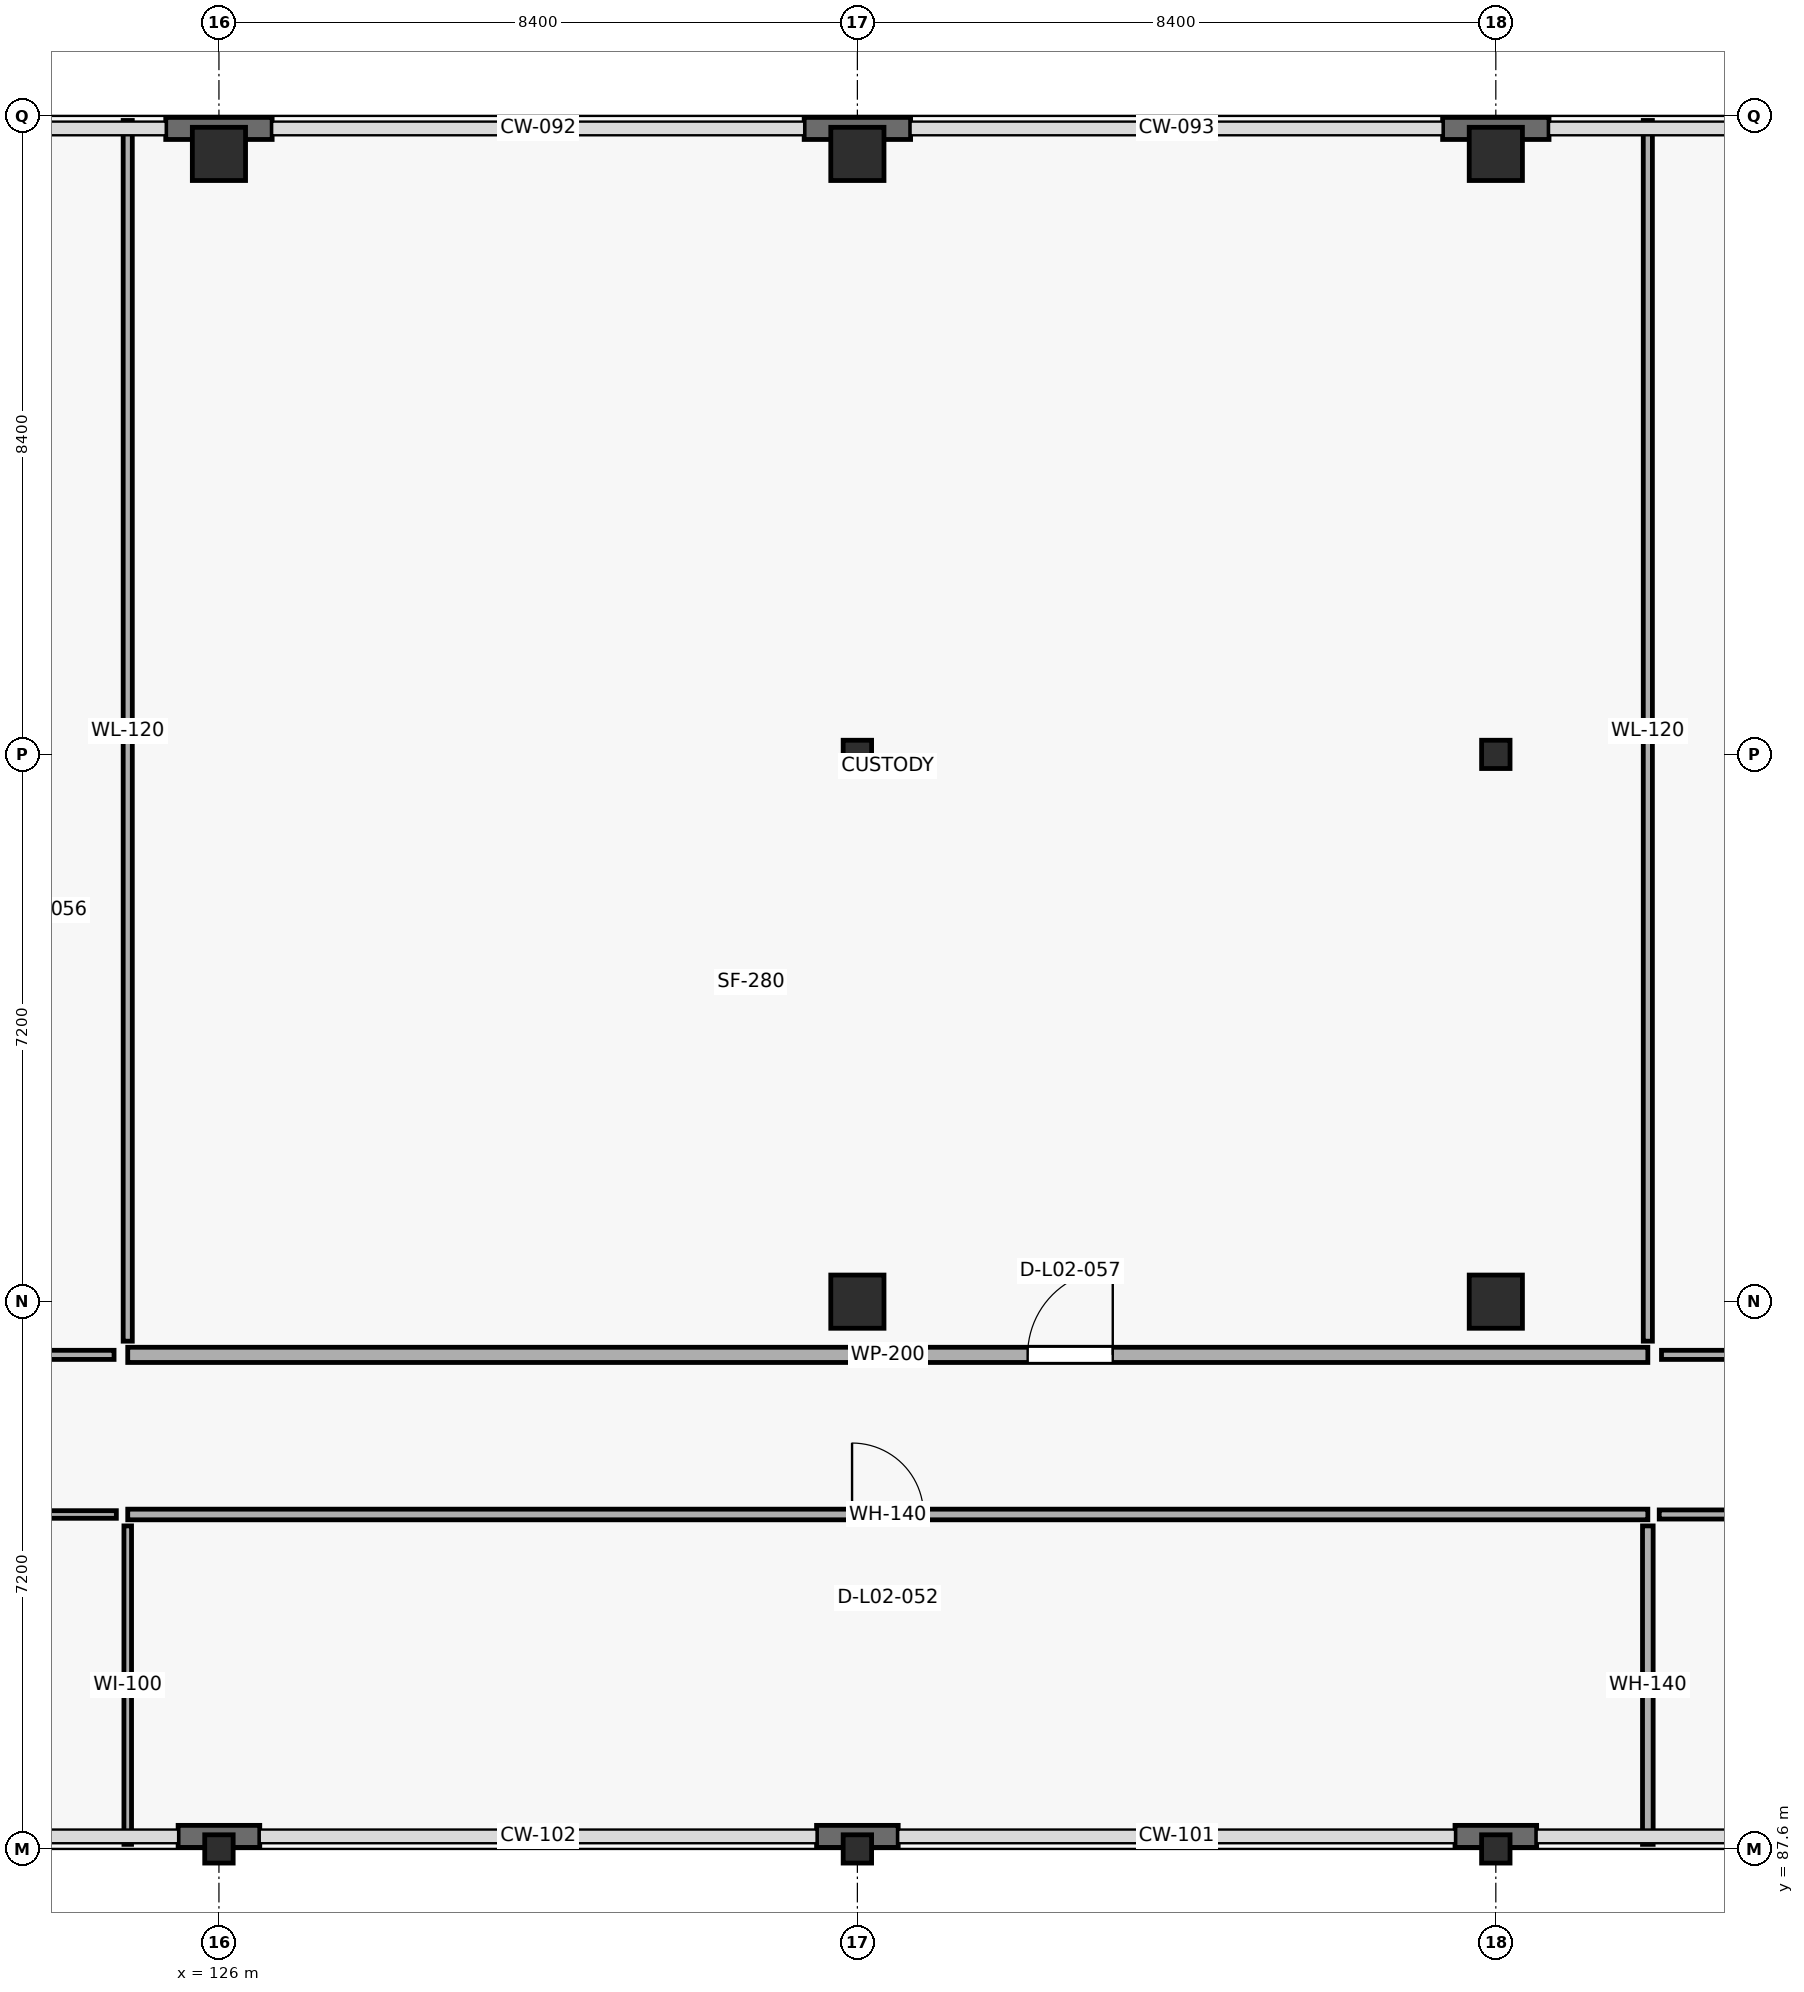
"""IFC4 building model, lengths in metres.
Left out: names, types, materials, properties, quantities, classifications, styles, units other than length and angle.
Written with IfcOpenShell. Run it as: python <this file> out.ifc"""

import sys

from ifc_helpers import new_model, si_unit, direction, frame, frame_2d, origin, origin_2d, place, context, subcontext, project, spatial, rectangle, i_section, extrude, element, fill, save


model = new_model("IFC4")
c1 = context("Model", 3, precision=1e-05, world=origin(), true_north=direction((0.0, 1.0)))
c2 = subcontext(c1, "Body", "Model", "MODEL_VIEW")
j1 = project(units=[si_unit("LENGTHUNIT", "METRE"), si_unit("PLANEANGLEUNIT", "RADIAN")], contexts=[c1])
p1 = place(None, origin())
s1 = spatial("IfcSite", under=j1, at=p1, CompositionType="ELEMENT")
p2 = place(p1, origin())
s2 = spatial("IfcBuilding", under=s1, at=p2, CompositionType="ELEMENT")
p3 = place(p2, frame((0.0, 0.0, 5.4)))
s3 = spatial("IfcBuildingStorey", under=s2, at=p3, CompositionType="ELEMENT", Elevation=5.4)
p4 = place(p3, frame((126.0, 87.6, 0.0), z_axis=(0.0, 0.0, 1.0), x_axis=(1.0, 0.0, 0.0)))
e1 = element("IfcColumn", 1, at=p4, inside=s3, PredefinedType="COLUMN", context=c2, shape_type="SweptSolid", body=[
    extrude(i_section(OverallWidth=0.374, OverallDepth=0.372, WebThickness=0.016, FlangeThickness=0.026, at=origin_2d()), origin(), (0.0, 0.0, 1.0), 4.8),
])
p5 = place(p3, frame((126.0, 109.9, 0.0), z_axis=(0.0, 0.0, 1.0), x_axis=(1.0, 0.0, 0.0)))
e2 = element("IfcColumn", 2, at=p5, inside=s3, PredefinedType="COLUMN", context=c2, shape_type="SweptSolid", body=[
    extrude(rectangle(XDim=0.7, YDim=0.7, at=origin_2d()), origin(), (0.0, 0.0, 1.0), 4.8),
])
p6 = place(p3, frame((134.4, 87.6, 0.0), z_axis=(0.0, 0.0, 1.0), x_axis=(1.0, 0.0, 0.0)))
e3 = element("IfcColumn", 3, at=p6, inside=s3, PredefinedType="COLUMN", context=c2, shape_type="SweptSolid", body=[
    extrude(i_section(OverallWidth=0.374, OverallDepth=0.372, WebThickness=0.016, FlangeThickness=0.026, at=origin_2d()), origin(), (0.0, 0.0, 1.0), 4.8),
])
p7 = place(p3, frame((134.4, 94.8, 0.0), z_axis=(0.0, 0.0, 1.0), x_axis=(1.0, 0.0, 0.0)))
e4 = element("IfcColumn", 4, at=p7, inside=s3, PredefinedType="COLUMN", context=c2, shape_type="SweptSolid", body=[
    extrude(rectangle(XDim=0.7, YDim=0.7, at=origin_2d()), origin(), (0.0, 0.0, 1.0), 4.8),
])
p8 = place(p3, frame((134.4, 102.0, 0.0), z_axis=(0.0, 0.0, 1.0), x_axis=(1.0, 0.0, 0.0)))
e5 = element("IfcColumn", 5, at=p8, inside=s3, PredefinedType="COLUMN", context=c2, shape_type="SweptSolid", body=[
    extrude(i_section(OverallWidth=0.374, OverallDepth=0.372, WebThickness=0.016, FlangeThickness=0.026, at=origin_2d()), origin(), (0.0, 0.0, 1.0), 4.8),
])
p9 = place(p3, frame((134.4, 109.9, 0.0), z_axis=(0.0, 0.0, 1.0), x_axis=(1.0, 0.0, 0.0)))
e6 = element("IfcColumn", 6, at=p9, inside=s3, PredefinedType="COLUMN", context=c2, shape_type="SweptSolid", body=[
    extrude(rectangle(XDim=0.7, YDim=0.7, at=origin_2d()), origin(), (0.0, 0.0, 1.0), 4.8),
])
p10 = place(p3, frame((142.8, 87.6, 0.0), z_axis=(0.0, 0.0, 1.0), x_axis=(1.0, 0.0, 0.0)))
e7 = element("IfcColumn", 7, at=p10, inside=s3, PredefinedType="COLUMN", context=c2, shape_type="SweptSolid", body=[
    extrude(i_section(OverallWidth=0.374, OverallDepth=0.372, WebThickness=0.016, FlangeThickness=0.026, at=origin_2d()), origin(), (0.0, 0.0, 1.0), 4.8),
])
p11 = place(p3, frame((142.8, 94.8, 0.0), z_axis=(0.0, 0.0, 1.0), x_axis=(1.0, 0.0, 0.0)))
e8 = element("IfcColumn", 8, at=p11, inside=s3, PredefinedType="COLUMN", context=c2, shape_type="SweptSolid", body=[
    extrude(rectangle(XDim=0.7, YDim=0.7, at=origin_2d()), origin(), (0.0, 0.0, 1.0), 4.8),
])
p12 = place(p3, frame((142.8, 102.0, 0.0), z_axis=(0.0, 0.0, 1.0), x_axis=(1.0, 0.0, 0.0)))
e9 = element("IfcColumn", 9, at=p12, inside=s3, PredefinedType="COLUMN", context=c2, shape_type="SweptSolid", body=[
    extrude(i_section(OverallWidth=0.374, OverallDepth=0.372, WebThickness=0.016, FlangeThickness=0.026, at=origin_2d()), origin(), (0.0, 0.0, 1.0), 4.8),
])
p13 = place(p3, frame((142.8, 109.9, 0.0), z_axis=(0.0, 0.0, 1.0), x_axis=(1.0, 0.0, 0.0)))
e10 = element("IfcColumn", 10, at=p13, inside=s3, PredefinedType="COLUMN", context=c2, shape_type="SweptSolid", body=[
    extrude(rectangle(XDim=0.7, YDim=0.7, at=origin_2d()), origin(), (0.0, 0.0, 1.0), 4.8),
])
p14 = place(p3, frame((125.3, 110.235, 0.0), z_axis=(0.0, 0.0, 1.0), x_axis=(1.0, 0.0, 0.0)))
e11 = element("IfcWall", 11, at=p14, inside=s3, PredefinedType="SOLIDWALL", context=c2, shape_type="SweptSolid", body=[
    extrude(rectangle(XDim=1.4, YDim=0.29, at=frame_2d((0.7, 0.0))), origin(), (0.0, 0.0, 1.0), 4.52),
])
p15 = place(p3, frame((133.7, 110.235, 0.0), z_axis=(0.0, 0.0, 1.0), x_axis=(1.0, 0.0, 0.0)))
e12 = element("IfcWall", 12, at=p15, inside=s3, PredefinedType="SOLIDWALL", context=c2, shape_type="SweptSolid", body=[
    extrude(rectangle(XDim=1.4, YDim=0.29, at=frame_2d((0.7, 0.0))), origin(), (0.0, 0.0, 1.0), 4.52),
])
p16 = place(p3, frame((142.1, 110.235, 0.0), z_axis=(0.0, 0.0, 1.0), x_axis=(1.0, 0.0, 0.0)))
e13 = element("IfcWall", 13, at=p16, inside=s3, PredefinedType="SOLIDWALL", context=c2, shape_type="SweptSolid", body=[
    extrude(rectangle(XDim=1.4, YDim=0.29, at=frame_2d((0.7, 0.0))), origin(), (0.0, 0.0, 1.0), 4.52),
])
for number, where, z_axis, x_axis in (
    (14, (143.337, 87.765, 0.0), (0.0, 0.0, 1.0), (-1.0, 0.0, 0.0)),
    (15, (134.937, 87.765, 0.0), (0.0, 0.0, 1.0), (-1.0, 0.0, 0.0)),
):
    element("IfcWall", number, at=place(p3, frame(where, z_axis=z_axis, x_axis=x_axis)), inside=s3, PredefinedType="SOLIDWALL", context=c2, shape_type="SweptSolid", body=[
        extrude(rectangle(XDim=1.074, YDim=0.29, at=frame_2d((0.537, 0.0))), origin(), (0.0, 0.0, 1.0), 4.52),
    ])
p17 = place(p3, frame((126.537, 87.765, 0.0), z_axis=(0.0, 0.0, 1.0), x_axis=(-1.0, 0.0, 0.0)))
e16 = element("IfcWall", 16, at=p17, inside=s3, PredefinedType="SOLIDWALL", context=c2, shape_type="SweptSolid", body=[
    extrude(rectangle(XDim=1.074, YDim=0.29, at=frame_2d((0.537, 0.0))), origin(), (0.0, 0.0, 1.0), 4.52),
])
p18 = place(p3, frame((124.8, 92.0, 0.0), z_axis=(0.0, 0.0, 1.0), x_axis=(1.0, 0.0, 0.0)))
e17 = element("IfcWall", 17, at=p18, inside=s3, PredefinedType="PARTITIONING", context=c2, shape_type="SweptSolid", body=[
    extrude(rectangle(XDim=20.0, YDim=0.14, at=frame_2d((10.0, 0.0))), origin(), (0.0, 0.0, 1.0), 4.52),
])
p19 = place(p18, frame((9.53, 0.0, 0.0)))
e18 = element("IfcOpeningElement", 18, at=p19, cuts=e17, PredefinedType="OPENING", context=c2, shape_type="SweptSolid", body=[
    extrude(rectangle(XDim=0.94, YDim=2.18, at=frame_2d((0.47, 1.09))), frame((0.0, 0.08, 0.0), z_axis=(0.0, -1.0, 0.0), x_axis=(1.0, 0.0, 0.0)), (0.0, 0.0, 1.0), 0.16),
])
p20 = place(p3, frame((144.8, 94.1, 0.0), z_axis=(0.0, 0.0, 1.0), x_axis=(-1.0, 0.0, 0.0)))
e19 = element("IfcWall", 19, at=p20, inside=s3, PredefinedType="PARTITIONING", context=c2, shape_type="SweptSolid", body=[
    extrude(rectangle(XDim=20.0, YDim=0.2, at=frame_2d((10.0, 0.0))), origin(), (0.0, 0.0, 1.0), 4.52),
])
p21 = place(p20, frame((7.04, 0.0, 0.0)))
e20 = element("IfcOpeningElement", 20, at=p21, cuts=e19, PredefinedType="OPENING", context=c2, shape_type="SweptSolid", body=[
    extrude(rectangle(XDim=1.12, YDim=2.15, at=frame_2d((0.56, 1.075))), frame((0.0, 0.11, 0.0), z_axis=(0.0, -1.0, 0.0), x_axis=(1.0, 0.0, 0.0)), (0.0, 0.0, 1.0), 0.22),
])
for number, where, z_axis, x_axis in (
    (21, (144.8, 94.28, 0.0), (0.0, 0.0, 1.0), (0.0, 1.0, 0.0)),
    (22, (124.8, 110.34, 0.0), (0.0, 0.0, 1.0), (0.0, -1.0, 0.0)),
):
    element("IfcWall", number, at=place(p3, frame(where, z_axis=z_axis, x_axis=x_axis)), inside=s3, PredefinedType="PARTITIONING", context=c2, shape_type="SweptSolid", body=[
        extrude(rectangle(XDim=16.06, YDim=0.12, at=frame_2d((8.03, 0.0))), origin(), (0.0, 0.0, 1.0), 4.52),
    ])
p22 = place(p3, frame((144.95, 92.0, 0.0), z_axis=(0.0, 0.0, 1.0), x_axis=(1.0, 0.0, 0.0)))
e23 = element("IfcWall", 23, at=p22, inside=s3, PredefinedType="PARTITIONING", context=c2, shape_type="SweptSolid", body=[
    extrude(rectangle(XDim=14.45, YDim=0.12, at=frame_2d((7.225, 0.0))), origin(), (0.0, 0.0, 1.0), 4.52),
])
p23 = place(p22, frame((6.445, 0.0, 0.0)))
e24 = element("IfcOpeningElement", 24, at=p23, cuts=e23, PredefinedType="OPENING", context=c2, shape_type="SweptSolid", body=[
    extrude(rectangle(XDim=1.56, YDim=2.44, at=frame_2d((0.78, 1.22))), frame((0.0, 0.07, 0.0), z_axis=(0.0, -1.0, 0.0), x_axis=(1.0, 0.0, 0.0)), (0.0, 0.0, 1.0), 0.14),
])
p24 = place(p3, frame((159.4, 94.1, 0.0), z_axis=(0.0, 0.0, 1.0), x_axis=(-1.0, 0.0, 0.0)))
e25 = element("IfcWall", 25, at=p24, inside=s3, PredefinedType="PARTITIONING", context=c2, shape_type="SweptSolid", body=[
    extrude(rectangle(XDim=14.42, YDim=0.12, at=frame_2d((7.21, 0.0))), origin(), (0.0, 0.0, 1.0), 4.52),
])
p25 = place(p3, frame((124.8, 91.85, 0.0), z_axis=(0.0, 0.0, 1.0), x_axis=(0.0, -1.0, 0.0)))
e26 = element("IfcWall", 26, at=p25, inside=s3, PredefinedType="PARTITIONING", context=c2, shape_type="SweptSolid", body=[
    extrude(rectangle(XDim=4.19, YDim=0.1, at=frame_2d((2.095, 0.0))), origin(), (0.0, 0.0, 1.0), 4.52),
])
p26 = place(p3, frame((144.8, 91.85, 0.0), z_axis=(0.0, 0.0, 1.0), x_axis=(0.0, -1.0, 0.0)))
e27 = element("IfcWall", 27, at=p26, inside=s3, PredefinedType="PARTITIONING", context=c2, shape_type="SweptSolid", body=[
    extrude(rectangle(XDim=4.19, YDim=0.14, at=frame_2d((2.095, 0.0))), origin(), (0.0, 0.0, 1.0), 4.52),
])
p27 = place(p3, frame((122.63, 92.0, 0.0), z_axis=(0.0, 0.0, 1.0), x_axis=(1.0, 0.0, 0.0)))
e28 = element("IfcWall", 28, at=p27, inside=s3, PredefinedType="PARTITIONING", context=c2, shape_type="SweptSolid", body=[
    extrude(rectangle(XDim=2.02, YDim=0.1, at=frame_2d((1.01, 0.0))), origin(), (0.0, 0.0, 1.0), 4.52),
])
p28 = place(p3, frame((124.62, 94.1, 0.0), z_axis=(0.0, 0.0, 1.0), x_axis=(-1.0, 0.0, 0.0)))
e29 = element("IfcWall", 29, at=p28, inside=s3, PredefinedType="PARTITIONING", context=c2, shape_type="SweptSolid", body=[
    extrude(rectangle(XDim=1.98, YDim=0.12, at=frame_2d((0.99, 0.0))), origin(), (0.0, 0.0, 1.0), 4.52),
])
p29 = place(p19, origin())
e30 = element("IfcDoor", 30, at=p29, inside=s3, OperationType="SINGLE_SWING_LEFT", PredefinedType="DOOR", context=c2, shape_type="SweptSolid", body=[
    extrude(rectangle(XDim=0.94, YDim=2.18, at=frame_2d((0.47, 1.09))), frame((0.0, 0.025, 0.0), z_axis=(0.0, -1.0, 0.0), x_axis=(1.0, 0.0, 0.0)), (0.0, 0.0, 1.0), 0.05),
])
fill(e18, e30)
p30 = place(p21, origin())
e31 = element("IfcDoor", 31, at=p30, inside=s3, OperationType="SINGLE_SWING_RIGHT", PredefinedType="DOOR", context=c2, shape_type="SweptSolid", body=[
    extrude(rectangle(XDim=1.12, YDim=2.15, at=frame_2d((0.56, 1.075))), frame((0.0, 0.025, 0.0), z_axis=(0.0, -1.0, 0.0), x_axis=(1.0, 0.0, 0.0)), (0.0, 0.0, 1.0), 0.05),
])
fill(e20, e31)
save(model, sys.argv[1])
